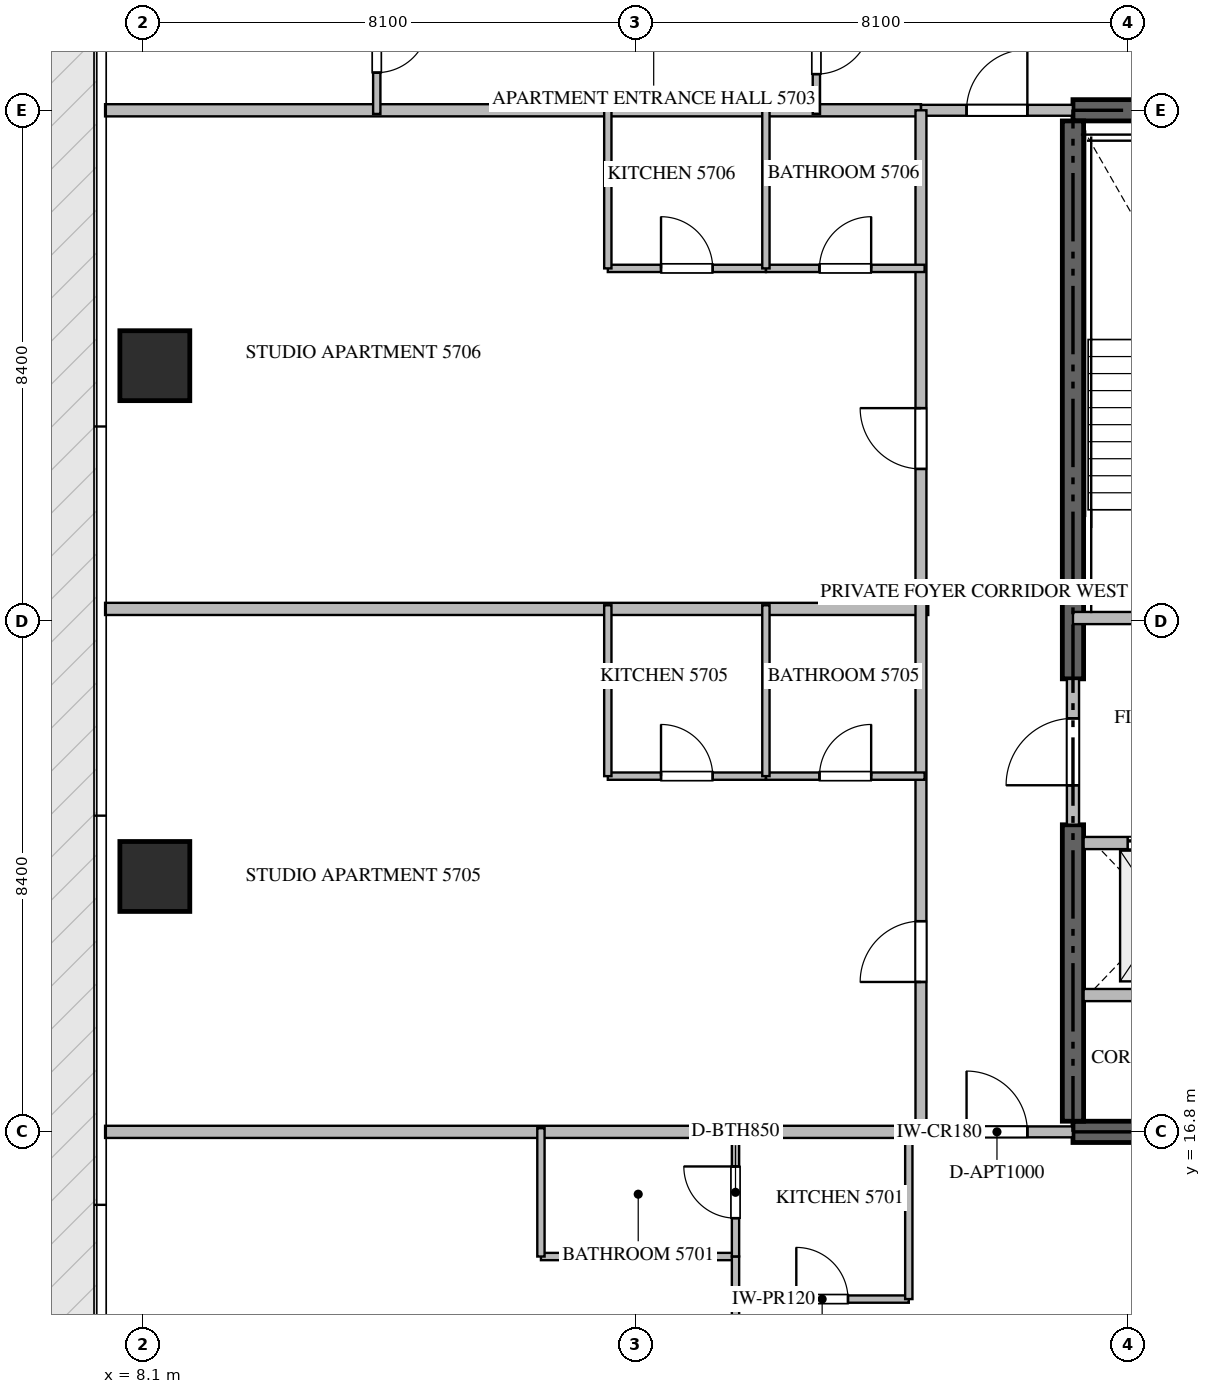
"""IFC4 building model, lengths in metres.
Left out: names, types, materials, properties, quantities, classifications, styles, units other than length and angle.
Written with IfcOpenShell. Run it as: python <this file> out.ifc"""

import sys

from ifc_helpers import new_model, si_unit, direction, frame, frame_2d, origin, origin_2d, place, context, subcontext, project, spatial, rectangle, extrude, source, transform, mapped, element, fill, save


model = new_model("IFC4")
c1 = context("Model", 3, precision=1e-05, world=origin(), true_north=direction((0.0, 1.0)))
c2 = subcontext(c1, "Body", "Model", "MODEL_VIEW")
j1 = project(units=[si_unit("LENGTHUNIT", "METRE"), si_unit("PLANEANGLEUNIT", "RADIAN")], contexts=[c1])
p1 = place(None, origin())
s1 = spatial("IfcSite", under=j1, at=p1, CompositionType="ELEMENT")
p2 = place(p1, origin())
s2 = spatial("IfcBuilding", under=s1, at=p2, CompositionType="ELEMENT")
p3 = place(p2, frame((0.0, 0.0, 229.7)))
s3 = spatial("IfcBuildingStorey", under=s2, at=p3, CompositionType="ELEMENT", Elevation=229.7)
for number, where, z_axis, x_axis in (
    (1, (23.4, 16.8, -0.26), (0.0, 0.0, 1.0), (1.0, 0.0, 0.0)),
    (2, (41.4, 33.6, -0.26), (0.0, 0.0, 1.0), (-1.0, 0.0, 0.0)),
):
    element("IfcWall", number, at=place(p3, frame(where, z_axis=z_axis, x_axis=x_axis)), inside=s3, PredefinedType="SHEAR", context=c2, shape_type="SweptSolid", body=[
        extrude(rectangle(XDim=18.0, YDim=0.35, at=frame_2d((9.0, 0.0))), origin(), (0.0, 0.0, 1.0), 3.848),
    ])
p4 = place(p3, frame((23.4, 16.975, -0.26), z_axis=(0.0, 0.0, 1.0), x_axis=(0.0, 1.0, 0.0)))
e3 = element("IfcWall", 3, at=p4, inside=s3, PredefinedType="SHEAR", context=c2, shape_type="SweptSolid", body=[
    extrude(rectangle(XDim=4.875, YDim=0.35, at=frame_2d((2.438, 0.0))), origin(), (0.0, 0.0, 1.0), 3.848),
])
p5 = place(p3, frame((23.4, 24.25, -0.26), z_axis=(0.0, 0.0, 1.0), x_axis=(0.0, 1.0, 0.0)))
e4 = element("IfcWall", 4, at=p5, inside=s3, PredefinedType="SHEAR", context=c2, shape_type="SweptSolid", body=[
    extrude(rectangle(XDim=9.175, YDim=0.35, at=frame_2d((4.587, 0.0))), origin(), (0.0, 0.0, 1.0), 3.848),
])
m1 = source(origin(), c2, "Body", "SweptSolid", [
    extrude(rectangle(XDim=1.15, YDim=1.15, at=origin_2d()), origin(), (0.0, 0.0, 1.0), 3.85),
])
for number, where, z_axis, x_axis in (
    (5, (8.3, 21.0, -0.26), (0.0, 0.0, 1.0), (1.0, 0.0, 0.0)),
    (6, (8.3, 29.4, -0.26), (0.0, 0.0, 1.0), (1.0, 0.0, 0.0)),
):
    element("IfcColumn", number, at=place(p3, frame(where, z_axis=z_axis, x_axis=x_axis)), inside=s3, PredefinedType="COLUMN", context=c2, shape_type="MappedRepresentation", body=[
        mapped(m1, transform((0.0, 0.0, 0.0), scale=1.0)),
    ])
p6 = place(p3, frame((23.4, 25.25, 0.0), z_axis=(0.0, 0.0, 1.0), x_axis=(1.0, 0.0, 0.0)))
e7 = element("IfcWall", 7, at=p6, inside=s3, PredefinedType="STANDARD", context=c2, shape_type="SweptSolid", body=[
    extrude(rectangle(XDim=4.45, YDim=0.2, at=frame_2d((2.225, 0.0))), origin(), (0.0, 0.0, 1.0), 3.59),
])
p7 = place(p6, frame((1.65, 0.0, 0.0)))
e8 = element("IfcOpeningElement", 8, at=p7, cuts=e7, PredefinedType="OPENING", context=c2, shape_type="SweptSolid", body=[
    extrude(rectangle(XDim=1.1, YDim=2.15, at=frame_2d((0.55, 1.075))), frame((0.0, 0.11, 0.0), z_axis=(0.0, -1.0, 0.0), x_axis=(1.0, 0.0, 0.0)), (0.0, 0.0, 1.0), 0.22),
])
p8 = place(p3, frame((23.575, 21.55, 0.0), z_axis=(0.0, 0.0, 1.0), x_axis=(1.0, 0.0, 0.0)))
e9 = element("IfcWall", 9, at=p8, inside=s3, PredefinedType="STANDARD", context=c2, shape_type="SweptSolid", body=[
    extrude(rectangle(XDim=2.475, YDim=0.2, at=frame_2d((1.238, 0.0))), origin(), (0.0, 0.0, 1.0), 3.59),
])
p9 = place(p8, frame((0.725, 0.0, 0.0)))
e10 = element("IfcOpeningElement", 10, at=p9, cuts=e9, PredefinedType="OPENING", context=c2, shape_type="SweptSolid", body=[
    extrude(rectangle(XDim=1.2, YDim=2.2, at=frame_2d((0.6, 1.1))), frame((0.0, 0.11, 0.0), z_axis=(0.0, -1.0, 0.0), x_axis=(1.0, 0.0, 0.0)), (0.0, 0.0, 1.0), 0.22),
])
p10 = place(p3, frame((23.575, 19.05, 0.0), z_axis=(0.0, 0.0, 1.0), x_axis=(1.0, 0.0, 0.0)))
e11 = element("IfcWall", 11, at=p10, inside=s3, PredefinedType="STANDARD", context=c2, shape_type="SweptSolid", body=[
    extrude(rectangle(XDim=2.475, YDim=0.2, at=frame_2d((1.238, 0.0))), origin(), (0.0, 0.0, 1.0), 3.59),
])
p11 = place(p3, frame((23.4, 21.852, 0.0), z_axis=(0.0, 0.0, 1.0), x_axis=(0.0, 1.0, 0.0)))
e12 = element("IfcWall", 12, at=p11, inside=s3, PredefinedType="STANDARD", context=c2, shape_type="SweptSolid", body=[
    extrude(rectangle(XDim=2.396, YDim=0.2, at=frame_2d((1.198, 0.0))), origin(), (0.0, 0.0, 1.0), 3.59),
])
p12 = place(p11, frame((0.648, 0.0, 0.0)))
e13 = element("IfcOpeningElement", 13, at=p12, cuts=e12, PredefinedType="OPENING", context=c2, shape_type="SweptSolid", body=[
    extrude(rectangle(XDim=1.1, YDim=2.15, at=frame_2d((0.55, 1.075))), frame((0.0, 0.11, 0.0), z_axis=(0.0, -1.0, 0.0), x_axis=(1.0, 0.0, 0.0)), (0.0, 0.0, 1.0), 0.22),
])
p13 = place(p3, frame((7.482, 25.4, 0.0), z_axis=(0.0, 0.0, 1.0), x_axis=(1.0, 0.0, 0.0)))
e14 = element("IfcWall", 14, at=p13, inside=s3, PredefinedType="PARTITIONING", context=c2, shape_type="SweptSolid", body=[
    extrude(rectangle(XDim=13.538, YDim=0.2, at=frame_2d((6.769, 0.0))), origin(), (0.0, 0.0, 1.0), 3.59),
])
for number, where, z_axis, x_axis in (
    (15, (7.482, 16.8, 0.0), (0.0, 0.0, 1.0), (1.0, 0.0, 0.0)),
    (16, (7.482, 33.6, 0.0), (0.0, 0.0, 1.0), (1.0, 0.0, 0.0)),
):
    element("IfcWall", number, at=place(p3, frame(where, z_axis=z_axis, x_axis=x_axis)), inside=s3, PredefinedType="PARTITIONING", context=c2, shape_type="SweptSolid", body=[
        extrude(rectangle(XDim=13.418, YDim=0.2, at=frame_2d((6.709, 0.0))), origin(), (0.0, 0.0, 1.0), 3.59),
    ])
p14 = place(p3, frame((20.902, 16.8, 0.0), z_axis=(0.0, 0.0, 1.0), x_axis=(1.0, 0.0, 0.0)))
e17 = element("IfcWall", 17, at=p14, inside=s3, PredefinedType="PARTITIONING", context=c2, shape_type="SweptSolid", body=[
    extrude(rectangle(XDim=2.496, YDim=0.18, at=frame_2d((1.248, 0.0))), origin(), (0.0, 0.0, 1.0), 3.59),
])
p15 = place(p14, frame((0.748, 0.0, 0.0)))
e18 = element("IfcOpeningElement", 18, at=p15, cuts=e17, PredefinedType="OPENING", context=c2, shape_type="SweptSolid", body=[
    extrude(rectangle(XDim=1.0, YDim=2.15, at=frame_2d((0.5, 1.075))), frame((0.0, 0.1, 0.0), z_axis=(0.0, -1.0, 0.0), x_axis=(1.0, 0.0, 0.0)), (0.0, 0.0, 1.0), 0.2),
])
p16 = place(p3, frame((20.902, 33.6, 0.0), z_axis=(0.0, 0.0, 1.0), x_axis=(1.0, 0.0, 0.0)))
e19 = element("IfcWall", 19, at=p16, inside=s3, PredefinedType="PARTITIONING", context=c2, shape_type="SweptSolid", body=[
    extrude(rectangle(XDim=2.496, YDim=0.18, at=frame_2d((1.248, 0.0))), origin(), (0.0, 0.0, 1.0), 3.59),
])
p17 = place(p16, frame((0.748, 0.0, 0.0)))
e20 = element("IfcOpeningElement", 20, at=p17, cuts=e19, PredefinedType="OPENING", context=c2, shape_type="SweptSolid", body=[
    extrude(rectangle(XDim=1.0, YDim=2.15, at=frame_2d((0.5, 1.075))), frame((0.0, 0.1, 0.0), z_axis=(0.0, -1.0, 0.0), x_axis=(1.0, 0.0, 0.0)), (0.0, 0.0, 1.0), 0.2),
])
p18 = place(p3, frame((20.9, 16.8, 0.0), z_axis=(0.0, 0.0, 1.0), x_axis=(0.0, 1.0, 0.0)))
e21 = element("IfcWall", 21, at=p18, inside=s3, PredefinedType="PARTITIONING", context=c2, shape_type="SweptSolid", body=[
    extrude(rectangle(XDim=16.8, YDim=0.18, at=frame_2d((8.4, 0.0))), origin(), (0.0, 0.0, 1.0), 3.59),
])
p19 = place(p18, frame((2.465, 0.0, 0.0)))
e22 = element("IfcOpeningElement", 22, at=p19, cuts=e21, PredefinedType="OPENING", context=c2, shape_type="SweptSolid", body=[
    extrude(rectangle(XDim=1.0, YDim=2.15, at=frame_2d((0.5, 1.075))), frame((0.0, 0.1, 0.0), z_axis=(0.0, -1.0, 0.0), x_axis=(1.0, 0.0, 0.0)), (0.0, 0.0, 1.0), 0.2),
])
p20 = place(p18, frame((10.902, 0.0, 0.0)))
e23 = element("IfcOpeningElement", 23, at=p20, cuts=e21, PredefinedType="OPENING", context=c2, shape_type="SweptSolid", body=[
    extrude(rectangle(XDim=1.0, YDim=2.15, at=frame_2d((0.5, 1.075))), frame((0.0, 0.1, 0.0), z_axis=(0.0, -1.0, 0.0), x_axis=(1.0, 0.0, 0.0)), (0.0, 0.0, 1.0), 0.2),
])
p21 = place(p3, frame((17.85, 14.05, 0.0), z_axis=(0.0, 0.0, 1.0), x_axis=(1.0, 0.0, 0.0)))
e24 = element("IfcWall", 24, at=p21, inside=s3, PredefinedType="PARTITIONING", context=c2, shape_type="SweptSolid", body=[
    extrude(rectangle(XDim=2.85, YDim=0.12, at=frame_2d((1.425, 0.0))), origin(), (0.0, 0.0, 1.0), 3.59),
])
p22 = place(p21, frame((1.0, 0.0, 0.0)))
e25 = element("IfcOpeningElement", 25, at=p22, cuts=e24, PredefinedType="OPENING", context=c2, shape_type="SweptSolid", body=[
    extrude(rectangle(XDim=0.85, YDim=2.1, at=frame_2d((0.425, 1.05))), frame((0.0, 0.07, 0.0), z_axis=(0.0, -1.0, 0.0), x_axis=(1.0, 0.0, 0.0)), (0.0, 0.0, 1.0), 0.14),
])
p23 = place(p3, frame((20.7, 14.05, 0.0), z_axis=(0.0, 0.0, 1.0), x_axis=(0.0, 1.0, 0.0)))
e26 = element("IfcWall", 26, at=p23, inside=s3, PredefinedType="PARTITIONING", context=c2, shape_type="SweptSolid", body=[
    extrude(rectangle(XDim=2.81, YDim=0.12, at=frame_2d((1.405, 0.0))), origin(), (0.0, 0.0, 1.0), 3.59),
])
p24 = place(p3, frame((14.65, 14.75, 0.0), z_axis=(0.0, 0.0, 1.0), x_axis=(1.0, 0.0, 0.0)))
e27 = element("IfcWall", 27, at=p24, inside=s3, PredefinedType="PARTITIONING", context=c2, shape_type="SweptSolid", body=[
    extrude(rectangle(XDim=3.2, YDim=0.12, at=frame_2d((1.6, 0.0))), origin(), (0.0, 0.0, 1.0), 3.59),
])
p25 = place(p3, frame((14.65, 14.75, 0.0), z_axis=(0.0, 0.0, 1.0), x_axis=(0.0, 1.0, 0.0)))
e28 = element("IfcWall", 28, at=p25, inside=s3, PredefinedType="PARTITIONING", context=c2, shape_type="SweptSolid", body=[
    extrude(rectangle(XDim=2.11, YDim=0.12, at=frame_2d((1.055, 0.0))), origin(), (0.0, 0.0, 1.0), 3.59),
])
p26 = place(p3, frame((17.85, 10.096, 0.0), z_axis=(0.0, 0.0, 1.0), x_axis=(0.0, 1.0, 0.0)))
e29 = element("IfcWall", 29, at=p26, inside=s3, PredefinedType="PARTITIONING", context=c2, shape_type="SweptSolid", body=[
    extrude(rectangle(XDim=4.654, YDim=0.12, at=frame_2d((2.327, 0.0))), origin(), (0.0, 0.0, 1.0), 3.59),
])
p27 = place(p26, frame((1.902, 0.0, 0.0)))
e30 = element("IfcOpeningElement", 30, at=p27, cuts=e29, PredefinedType="OPENING", context=c2, shape_type="SweptSolid", body=[
    extrude(rectangle(XDim=0.85, YDim=2.1, at=frame_2d((0.425, 1.05))), frame((0.0, 0.07, 0.0), z_axis=(0.0, -1.0, 0.0), x_axis=(1.0, 0.0, 0.0)), (0.0, 0.0, 1.0), 0.14),
])
p28 = place(p3, frame((17.85, 14.752, 0.0), z_axis=(0.0, 0.0, 1.0), x_axis=(0.0, 1.0, 0.0)))
e31 = element("IfcWall", 31, at=p28, inside=s3, PredefinedType="PARTITIONING", context=c2, shape_type="SweptSolid", body=[
    extrude(rectangle(XDim=2.108, YDim=0.12, at=frame_2d((1.054, 0.0))), origin(), (0.0, 0.0, 1.0), 3.59),
])
p29 = place(p28, frame((0.629, 0.0, 0.0)))
e32 = element("IfcOpeningElement", 32, at=p29, cuts=e31, PredefinedType="OPENING", context=c2, shape_type="SweptSolid", body=[
    extrude(rectangle(XDim=0.85, YDim=2.1, at=frame_2d((0.425, 1.05))), frame((0.0, 0.07, 0.0), z_axis=(0.0, -1.0, 0.0), x_axis=(1.0, 0.0, 0.0)), (0.0, 0.0, 1.0), 0.14),
])
p30 = place(p3, frame((19.18, 35.75, 0.0), z_axis=(0.0, 0.0, 1.0), x_axis=(0.0, -1.0, 0.0)))
e33 = element("IfcWall", 33, at=p30, inside=s3, PredefinedType="PARTITIONING", context=c2, shape_type="SweptSolid", body=[
    extrude(rectangle(XDim=2.21, YDim=0.12, at=frame_2d((1.105, 0.0))), origin(), (0.0, 0.0, 1.0), 3.59),
])
p31 = place(p30, frame((0.655, 0.0, 0.0)))
e34 = element("IfcOpeningElement", 34, at=p31, cuts=e33, PredefinedType="OPENING", context=c2, shape_type="SweptSolid", body=[
    extrude(rectangle(XDim=0.9, YDim=2.1, at=frame_2d((0.45, 1.05))), frame((0.0, 0.07, 0.0), z_axis=(0.0, -1.0, 0.0), x_axis=(1.0, 0.0, 0.0)), (0.0, 0.0, 1.0), 0.14),
])
p32 = place(p3, frame((11.95, 35.748, 0.0), z_axis=(0.0, 0.0, 1.0), x_axis=(0.0, -1.0, 0.0)))
e35 = element("IfcWall", 35, at=p32, inside=s3, PredefinedType="PARTITIONING", context=c2, shape_type="SweptSolid", body=[
    extrude(rectangle(XDim=2.208, YDim=0.12, at=frame_2d((1.104, 0.0))), origin(), (0.0, 0.0, 1.0), 3.59),
])
p33 = place(p32, frame((0.679, 0.0, 0.0)))
e36 = element("IfcOpeningElement", 36, at=p33, cuts=e35, PredefinedType="OPENING", context=c2, shape_type="SweptSolid", body=[
    extrude(rectangle(XDim=0.85, YDim=2.1, at=frame_2d((0.425, 1.05))), frame((0.0, 0.07, 0.0), z_axis=(0.0, -1.0, 0.0), x_axis=(1.0, 0.0, 0.0)), (0.0, 0.0, 1.0), 0.14),
])
p34 = place(p3, frame((15.75, 22.65, 0.0), z_axis=(0.0, 0.0, 1.0), x_axis=(1.0, 0.0, 0.0)))
e37 = element("IfcWall", 37, at=p34, inside=s3, PredefinedType="PARTITIONING", context=c2, shape_type="SweptSolid", body=[
    extrude(rectangle(XDim=2.6, YDim=0.12, at=frame_2d((1.3, 0.0))), origin(), (0.0, 0.0, 1.0), 3.59),
])
p35 = place(p34, frame((0.875, 0.0, 0.0)))
e38 = element("IfcOpeningElement", 38, at=p35, cuts=e37, PredefinedType="OPENING", context=c2, shape_type="SweptSolid", body=[
    extrude(rectangle(XDim=0.85, YDim=2.1, at=frame_2d((0.425, 1.05))), frame((0.0, 0.07, 0.0), z_axis=(0.0, -1.0, 0.0), x_axis=(1.0, 0.0, 0.0)), (0.0, 0.0, 1.0), 0.14),
])
p36 = place(p3, frame((18.352, 22.65, 0.0), z_axis=(0.0, 0.0, 1.0), x_axis=(1.0, 0.0, 0.0)))
e39 = element("IfcWall", 39, at=p36, inside=s3, PredefinedType="PARTITIONING", context=c2, shape_type="SweptSolid", body=[
    extrude(rectangle(XDim=2.608, YDim=0.12, at=frame_2d((1.304, 0.0))), origin(), (0.0, 0.0, 1.0), 3.59),
])
p37 = place(p36, frame((0.879, 0.0, 0.0)))
e40 = element("IfcOpeningElement", 40, at=p37, cuts=e39, PredefinedType="OPENING", context=c2, shape_type="SweptSolid", body=[
    extrude(rectangle(XDim=0.85, YDim=2.1, at=frame_2d((0.425, 1.05))), frame((0.0, 0.07, 0.0), z_axis=(0.0, -1.0, 0.0), x_axis=(1.0, 0.0, 0.0)), (0.0, 0.0, 1.0), 0.14),
])
for number, where, z_axis, x_axis in (
    (41, (18.35, 22.65, 0.0), (0.0, 0.0, 1.0), (0.0, 1.0, 0.0)),
    (42, (15.75, 22.65, 0.0), (0.0, 0.0, 1.0), (0.0, 1.0, 0.0)),
):
    element("IfcWall", number, at=place(p3, frame(where, z_axis=z_axis, x_axis=x_axis)), inside=s3, PredefinedType="PARTITIONING", context=c2, shape_type="SweptSolid", body=[
        extrude(rectangle(XDim=2.81, YDim=0.12, at=frame_2d((1.405, 0.0))), origin(), (0.0, 0.0, 1.0), 3.59),
    ])
p38 = place(p3, frame((15.75, 31.0, 0.0), z_axis=(0.0, 0.0, 1.0), x_axis=(1.0, 0.0, 0.0)))
e43 = element("IfcWall", 43, at=p38, inside=s3, PredefinedType="PARTITIONING", context=c2, shape_type="SweptSolid", body=[
    extrude(rectangle(XDim=2.6, YDim=0.12, at=frame_2d((1.3, 0.0))), origin(), (0.0, 0.0, 1.0), 3.59),
])
p39 = place(p38, frame((0.875, 0.0, 0.0)))
e44 = element("IfcOpeningElement", 44, at=p39, cuts=e43, PredefinedType="OPENING", context=c2, shape_type="SweptSolid", body=[
    extrude(rectangle(XDim=0.85, YDim=2.1, at=frame_2d((0.425, 1.05))), frame((0.0, 0.07, 0.0), z_axis=(0.0, -1.0, 0.0), x_axis=(1.0, 0.0, 0.0)), (0.0, 0.0, 1.0), 0.14),
])
p40 = place(p3, frame((18.352, 31.0, 0.0), z_axis=(0.0, 0.0, 1.0), x_axis=(1.0, 0.0, 0.0)))
e45 = element("IfcWall", 45, at=p40, inside=s3, PredefinedType="PARTITIONING", context=c2, shape_type="SweptSolid", body=[
    extrude(rectangle(XDim=2.608, YDim=0.12, at=frame_2d((1.304, 0.0))), origin(), (0.0, 0.0, 1.0), 3.59),
])
p41 = place(p40, frame((0.879, 0.0, 0.0)))
e46 = element("IfcOpeningElement", 46, at=p41, cuts=e45, PredefinedType="OPENING", context=c2, shape_type="SweptSolid", body=[
    extrude(rectangle(XDim=0.85, YDim=2.1, at=frame_2d((0.425, 1.05))), frame((0.0, 0.07, 0.0), z_axis=(0.0, -1.0, 0.0), x_axis=(1.0, 0.0, 0.0)), (0.0, 0.0, 1.0), 0.14),
])
for number, where, z_axis, x_axis in (
    (47, (18.35, 31.0, 0.0), (0.0, 0.0, 1.0), (0.0, 1.0, 0.0)),
    (48, (15.75, 31.0, 0.0), (0.0, 0.0, 1.0), (0.0, 1.0, 0.0)),
):
    element("IfcWall", number, at=place(p3, frame(where, z_axis=z_axis, x_axis=x_axis)), inside=s3, PredefinedType="PARTITIONING", context=c2, shape_type="SweptSolid", body=[
        extrude(rectangle(XDim=2.66, YDim=0.12, at=frame_2d((1.33, 0.0))), origin(), (0.0, 0.0, 1.0), 3.59),
    ])
m2 = source(origin(), c2, "Body", "SweptSolid", [
    extrude(rectangle(XDim=1.2, YDim=2.2, at=frame_2d((0.6, 1.1))), frame((0.0, 0.025, 0.0), z_axis=(0.0, -1.0, 0.0), x_axis=(1.0, 0.0, 0.0)), (0.0, 0.0, 1.0), 0.05),
])
p42 = place(p9, origin())
e49 = element("IfcDoor", 49, at=p42, inside=s3, OperationType="DOUBLE_DOOR_SLIDING", PredefinedType="DOOR", context=c2, shape_type="MappedRepresentation", body=[
    mapped(m2, transform((0.0, 0.0, 0.0), scale=1.0)),
])
fill(e10, e49)
m3 = source(origin(), c2, "Body", "SweptSolid", [
    extrude(rectangle(XDim=1.1, YDim=2.15, at=frame_2d((0.55, 1.075))), frame((0.0, 0.025, 0.0), z_axis=(0.0, -1.0, 0.0), x_axis=(1.0, 0.0, 0.0)), (0.0, 0.0, 1.0), 0.05),
])
p43 = place(p12, origin())
e50 = element("IfcDoor", 50, at=p43, inside=s3, OperationType="SINGLE_SWING_LEFT", PredefinedType="DOOR", context=c2, shape_type="MappedRepresentation", body=[
    mapped(m3, transform((0.0, 0.0, 0.0), scale=1.0)),
])
fill(e13, e50)
m4 = source(origin(), c2, "Body", "SweptSolid", [
    extrude(rectangle(XDim=1.0, YDim=2.15, at=frame_2d((0.5, 1.075))), frame((0.0, 0.025, 0.0), z_axis=(0.0, -1.0, 0.0), x_axis=(1.0, 0.0, 0.0)), (0.0, 0.0, 1.0), 0.05),
])
p44 = place(p15, origin())
e51 = element("IfcDoor", 51, at=p44, inside=s3, OperationType="SINGLE_SWING_LEFT", PredefinedType="DOOR", context=c2, shape_type="MappedRepresentation", body=[
    mapped(m4, transform((0.0, 0.0, 0.0), scale=1.0)),
])
fill(e18, e51)
p45 = place(p17, origin())
e52 = element("IfcDoor", 52, at=p45, inside=s3, OperationType="SINGLE_SWING_RIGHT", PredefinedType="DOOR", context=c2, shape_type="MappedRepresentation", body=[
    mapped(m4, transform((0.0, 0.0, 0.0), scale=1.0)),
])
fill(e20, e52)
p46 = place(p19, origin())
e53 = element("IfcDoor", 53, at=p46, inside=s3, OperationType="SINGLE_SWING_LEFT", PredefinedType="DOOR", context=c2, shape_type="MappedRepresentation", body=[
    mapped(m4, transform((0.0, 0.0, 0.0), scale=1.0)),
])
fill(e22, e53)
p47 = place(p20, origin())
e54 = element("IfcDoor", 54, at=p47, inside=s3, OperationType="SINGLE_SWING_RIGHT", PredefinedType="DOOR", context=c2, shape_type="MappedRepresentation", body=[
    mapped(m4, transform((0.0, 0.0, 0.0), scale=1.0)),
])
fill(e23, e54)
m5 = source(origin(), c2, "Body", "SweptSolid", [
    extrude(rectangle(XDim=0.85, YDim=2.1, at=frame_2d((0.425, 1.05))), frame((0.0, 0.025, 0.0), z_axis=(0.0, -1.0, 0.0), x_axis=(1.0, 0.0, 0.0)), (0.0, 0.0, 1.0), 0.05),
])
p48 = place(p22, origin())
e55 = element("IfcDoor", 55, at=p48, inside=s3, OperationType="SINGLE_SWING_LEFT", PredefinedType="DOOR", context=c2, shape_type="MappedRepresentation", body=[
    mapped(m5, transform((0.0, 0.0, 0.0), scale=1.0)),
])
fill(e25, e55)
p49 = place(p29, origin())
e56 = element("IfcDoor", 56, at=p49, inside=s3, OperationType="SINGLE_SWING_RIGHT", PredefinedType="DOOR", context=c2, shape_type="MappedRepresentation", body=[
    mapped(m5, transform((0.0, 0.0, 0.0), scale=1.0)),
])
fill(e32, e56)
m6 = source(origin(), c2, "Body", "SweptSolid", [
    extrude(rectangle(XDim=0.9, YDim=2.1, at=frame_2d((0.45, 1.05))), frame((0.0, 0.025, 0.0), z_axis=(0.0, -1.0, 0.0), x_axis=(1.0, 0.0, 0.0)), (0.0, 0.0, 1.0), 0.05),
])
p50 = place(p31, origin())
e57 = element("IfcDoor", 57, at=p50, inside=s3, OperationType="SINGLE_SWING_LEFT", PredefinedType="DOOR", context=c2, shape_type="MappedRepresentation", body=[
    mapped(m6, transform((0.0, 0.0, 0.0), scale=1.0)),
])
fill(e34, e57)
p51 = place(p33, origin())
e58 = element("IfcDoor", 58, at=p51, inside=s3, OperationType="SINGLE_SWING_LEFT", PredefinedType="DOOR", context=c2, shape_type="MappedRepresentation", body=[
    mapped(m5, transform((0.0, 0.0, 0.0), scale=1.0)),
])
fill(e36, e58)
p52 = place(p35, origin())
e59 = element("IfcDoor", 59, at=p52, inside=s3, OperationType="SINGLE_SWING_LEFT", PredefinedType="DOOR", context=c2, shape_type="MappedRepresentation", body=[
    mapped(m5, transform((0.0, 0.0, 0.0), scale=1.0)),
])
fill(e38, e59)
p53 = place(p37, origin())
e60 = element("IfcDoor", 60, at=p53, inside=s3, OperationType="SINGLE_SWING_RIGHT", PredefinedType="DOOR", context=c2, shape_type="MappedRepresentation", body=[
    mapped(m5, transform((0.0, 0.0, 0.0), scale=1.0)),
])
fill(e40, e60)
p54 = place(p39, origin())
e61 = element("IfcDoor", 61, at=p54, inside=s3, OperationType="SINGLE_SWING_LEFT", PredefinedType="DOOR", context=c2, shape_type="MappedRepresentation", body=[
    mapped(m5, transform((0.0, 0.0, 0.0), scale=1.0)),
])
fill(e44, e61)
p55 = place(p41, origin())
e62 = element("IfcDoor", 62, at=p55, inside=s3, OperationType="SINGLE_SWING_RIGHT", PredefinedType="DOOR", context=c2, shape_type="MappedRepresentation", body=[
    mapped(m5, transform((0.0, 0.0, 0.0), scale=1.0)),
])
fill(e46, e62)
save(model, sys.argv[1])
